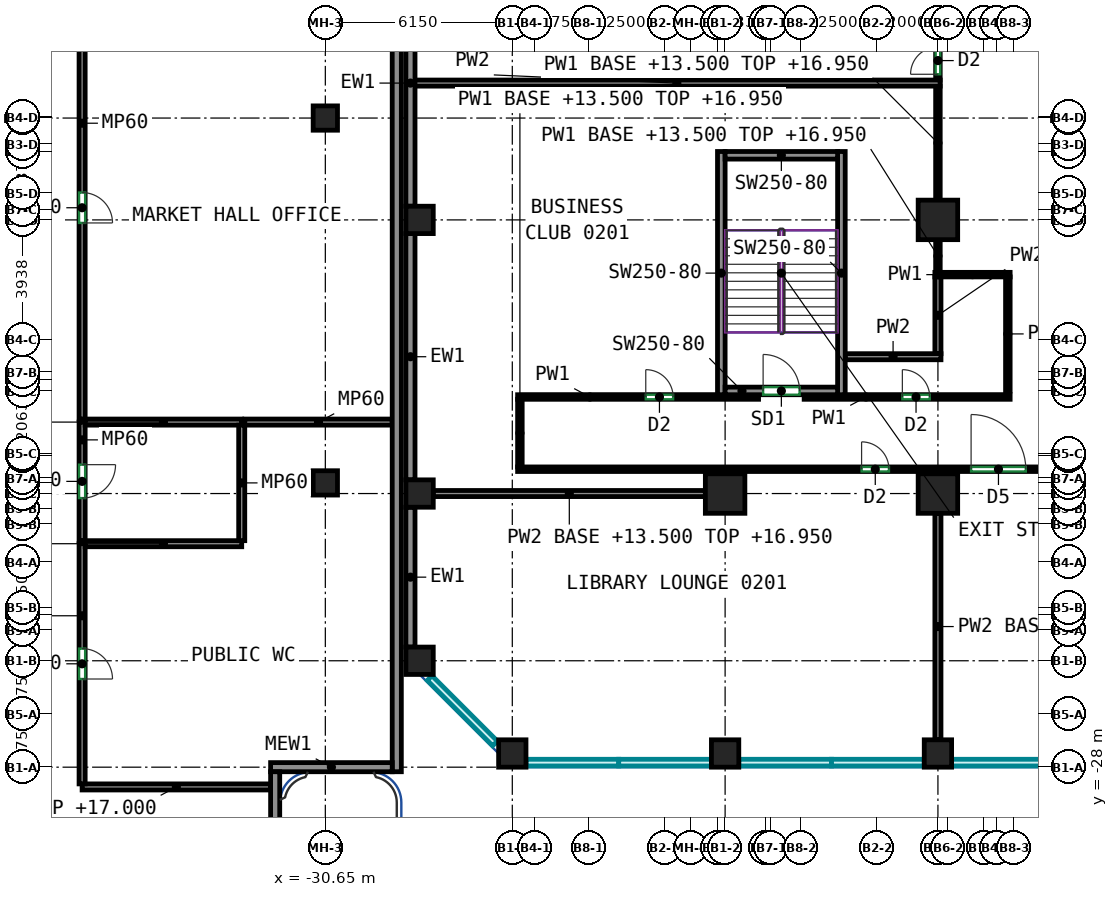
"""IFC4 building model, lengths in metres.
Left out: names, types, materials, properties, quantities, classifications, styles, units other than length and angle.
Written with IfcOpenShell. Run it as: python <this file> out.ifc"""

import sys

from ifc_helpers import new_model, si_unit, direction, frame, frame_2d, origin, origin_2d, place, context, subcontext, project, spatial, rectangle, extrude, source, transform, mapped, element, fill, save


model = new_model("IFC4")
c1 = context("Model", 3, precision=1e-05, world=origin(), true_north=direction((0.0, 1.0)))
c2 = subcontext(c1, "Body", "Model", "MODEL_VIEW")
j1 = project(units=[si_unit("LENGTHUNIT", "METRE"), si_unit("PLANEANGLEUNIT", "RADIAN")], contexts=[c1])
p1 = place(None, origin())
s1 = spatial("IfcSite", under=j1, at=p1, CompositionType="ELEMENT")
p2 = place(p1, origin())
s2 = spatial("IfcBuilding", under=s1, at=p2, CompositionType="ELEMENT")
p3 = place(p2, frame((0.0, 0.0, 13.5)))
s3 = spatial("IfcBuildingStorey", under=s2, at=p3, CompositionType="ELEMENT", Elevation=13.5)
m1 = source(origin(), c2, "Body", "SweptSolid", [
    extrude(rectangle(XDim=0.9, YDim=0.9, at=origin_2d()), origin(), (0.0, 0.0, 1.0), 4.1),
])
for number, where, z_axis, x_axis in (
    (1, (-27.55, -24.5, 0.0), (0.0, 0.0, 1.0), (1.0, 0.0, 0.0)),
    (2, (-27.55, -19.0, 0.0), (0.0, 0.0, 1.0), (1.0, 0.0, 0.0)),
    (3, (-27.55, -10.0, 0.0), (0.0, 0.0, 1.0), (1.0, 0.0, 0.0)),
    (4, (-24.5, -27.55, 0.0), (0.0, 0.0, 1.0), (1.0, 0.0, 0.0)),
    (5, (-17.5, -27.55, 0.0), (0.0, 0.0, 1.0), (1.0, 0.0, 0.0)),
):
    element("IfcColumn", number, at=place(p3, frame(where, z_axis=z_axis, x_axis=x_axis)), inside=s3, PredefinedType="COLUMN", context=c2, shape_type="MappedRepresentation", body=[
        mapped(m1, transform((0.0, 0.0, 0.0))),
    ])
m2 = source(origin(), c2, "Body", "SweptSolid", [
    extrude(rectangle(XDim=1.3, YDim=1.3, at=origin_2d()), origin(), (0.0, 0.0, 1.0), 4.1),
])
p4 = place(p3, frame((-17.5, -19.0, 0.0), z_axis=(0.0, 0.0, 1.0), x_axis=(1.0, 0.0, 0.0)))
e6 = element("IfcColumn", 6, at=p4, inside=s3, PredefinedType="COLUMN", context=c2, shape_type="MappedRepresentation", body=[
    mapped(m2, transform((0.0, 0.0, 0.0))),
])
p5 = place(p3, frame((-10.5, -27.55, 0.0), z_axis=(0.0, 0.0, 1.0), x_axis=(1.0, 0.0, 0.0)))
e7 = element("IfcColumn", 7, at=p5, inside=s3, PredefinedType="COLUMN", context=c2, shape_type="MappedRepresentation", body=[
    mapped(m1, transform((0.0, 0.0, 0.0))),
])
for number, where, z_axis, x_axis in (
    (8, (-10.5, -19.0, 0.0), (0.0, 0.0, 1.0), (1.0, 0.0, 0.0)),
    (9, (-10.5, -10.0, 0.0), (0.0, 0.0, 1.0), (1.0, 0.0, 0.0)),
):
    element("IfcColumn", number, at=place(p3, frame(where, z_axis=z_axis, x_axis=x_axis)), inside=s3, PredefinedType="COLUMN", context=c2, shape_type="MappedRepresentation", body=[
        mapped(m2, transform((0.0, 0.0, 0.0))),
    ])
m3 = source(origin(), c2, "Body", "SweptSolid", [
    extrude(rectangle(XDim=8.0, YDim=0.25, at=frame_2d((4.0, 0.0))), origin(), (0.0, 0.0, 1.0), 4.1),
])
for number, where, z_axis, x_axis in (
    (10, (-17.625, -15.75, 0.0), (0.0, 0.0, 1.0), (0.0, 1.0, 0.0)),
    (11, (-13.675, -15.75, 0.0), (0.0, 0.0, 1.0), (0.0, 1.0, 0.0)),
):
    element("IfcWall", number, at=place(p3, frame(where, z_axis=z_axis, x_axis=x_axis)), inside=s3, PredefinedType="SHEAR", context=c2, shape_type="MappedRepresentation", body=[
        mapped(m3, transform((0.0, 0.0, 0.0))),
    ])
m4 = source(origin(), c2, "Body", "SweptSolid", [
    extrude(rectangle(XDim=3.7, YDim=0.25, at=frame_2d((1.85, 0.0))), origin(), (0.0, 0.0, 1.0), 4.1),
])
p6 = place(p3, frame((-17.5, -15.625, 0.0), z_axis=(0.0, 0.0, 1.0), x_axis=(1.0, 0.0, 0.0)))
e12 = element("IfcWall", 12, at=p6, inside=s3, PredefinedType="SHEAR", context=c2, shape_type="MappedRepresentation", body=[
    mapped(m4, transform((0.0, 0.0, 0.0))),
])
p7 = place(p6, frame((1.25, 0.0, 0.0)))
e13 = element("IfcOpeningElement", 13, at=p7, cuts=e12, PredefinedType="OPENING", context=c2, shape_type="SweptSolid", body=[
    extrude(rectangle(XDim=1.2, YDim=2.1, at=frame_2d((0.6, 1.05))), frame((0.0, 0.135, 0.0), z_axis=(0.0, -1.0, 0.0), x_axis=(1.0, 0.0, 0.0)), (0.0, 0.0, 1.0), 0.27),
])
p8 = place(p3, frame((-17.5, -7.875, 0.0), z_axis=(0.0, 0.0, 1.0), x_axis=(1.0, 0.0, 0.0)))
e14 = element("IfcWall", 14, at=p8, inside=s3, PredefinedType="SHEAR", context=c2, shape_type="MappedRepresentation", body=[
    mapped(m4, transform((0.0, 0.0, 0.0))),
])
m5 = source(origin(), c2, "Body", "SweptSolid", [
    extrude(rectangle(XDim=0.8, YDim=0.8, at=origin_2d()), origin(), (0.0, 0.0, 1.0), 4.1),
])
for number, where, z_axis, x_axis in (
    (15, (-30.65, -18.65, 0.0), (0.0, 0.0, 1.0), (1.0, 0.0, 0.0)),
    (16, (-30.65, -6.65, 0.0), (0.0, 0.0, 1.0), (1.0, 0.0, 0.0)),
):
    element("IfcColumn", number, at=place(p3, frame(where, z_axis=z_axis, x_axis=x_axis)), inside=s3, PredefinedType="COLUMN", context=c2, shape_type="MappedRepresentation", body=[
        mapped(m5, transform((0.0, 0.0, 0.0))),
    ])
m6 = source(origin(), c2, "Body", "SweptSolid", [
    extrude(rectangle(XDim=8.1, YDim=0.3, at=frame_2d((4.05, 0.0))), origin(), (0.0, 0.0, 1.0), 4.1),
])
for number, where, z_axis, x_axis in (
    (17, (-27.85, -1.45, 0.0), (0.0, 0.0, 1.0), (0.0, -1.0, 0.0)),
    (18, (-27.85, -10.45, 0.0), (0.0, 0.0, 1.0), (0.0, -1.0, 0.0)),
):
    element("IfcWall", number, at=place(p3, frame(where, z_axis=z_axis, x_axis=x_axis)), inside=s3, PredefinedType="SOLIDWALL", context=c2, shape_type="MappedRepresentation", body=[
        mapped(m6, transform((0.0, 0.0, 0.0))),
    ])
m7 = source(origin(), c2, "Body", "SweptSolid", [
    extrude(rectangle(XDim=4.6, YDim=0.3, at=frame_2d((2.3, 0.0))), origin(), (0.0, 0.0, 1.0), 4.1),
])
p9 = place(p3, frame((-27.85, -19.45, 0.0), z_axis=(0.0, 0.0, 1.0), x_axis=(0.0, -1.0, 0.0)))
e19 = element("IfcWall", 19, at=p9, inside=s3, PredefinedType="SOLIDWALL", context=c2, shape_type="MappedRepresentation", body=[
    mapped(m7, transform((0.0, 0.0, 0.0))),
])
m8 = source(origin(), c2, "Body", "SweptSolid", [
    extrude(rectangle(XDim=56.3, YDim=0.3, at=frame_2d((28.15, 0.0))), origin(), (0.0, 0.0, 1.0), 4.1),
])
p10 = place(p3, frame((-28.3, 28.15, 0.0), z_axis=(0.0, 0.0, 1.0), x_axis=(0.0, -1.0, 0.0)))
e20 = element("IfcWall", 20, at=p10, inside=s3, PredefinedType="SOLIDWALL", context=c2, shape_type="MappedRepresentation", body=[
    mapped(m8, transform((0.0, 0.0, 0.0))),
])
m9 = source(origin(), c2, "Body", "SweptSolid", [
    extrude(rectangle(XDim=4.0, YDim=0.3, at=frame_2d((2.0, 0.0))), origin(), (0.0, 0.0, 1.0), 4.1),
])
p11 = place(p3, frame((-28.45, -28.0, 0.0), z_axis=(0.0, 0.0, 1.0), x_axis=(-1.0, 0.0, 0.0)))
e21 = element("IfcWall", 21, at=p11, inside=s3, PredefinedType="SOLIDWALL", context=c2, shape_type="MappedRepresentation", body=[
    mapped(m9, transform((0.0, 0.0, 0.0))),
])
m10 = source(origin(), c2, "Body", "SweptSolid", [
    extrude(rectangle(XDim=15.7, YDim=0.3, at=frame_2d((7.85, 0.0))), origin(), (0.0, 0.0, 1.0), 4.1),
])
p12 = place(p3, frame((-32.3, -28.15, 0.0), z_axis=(0.0, 0.0, 1.0), x_axis=(0.0, -1.0, 0.0)))
e22 = element("IfcWall", 22, at=p12, inside=s3, PredefinedType="SOLIDWALL", context=c2, shape_type="MappedRepresentation", body=[
    mapped(m10, transform((0.0, 0.0, 0.0))),
])
p13 = place(p12, frame((6.326, 0.0, 0.0)))
e23 = element("IfcOpeningElement", 23, at=p13, cuts=e22, PredefinedType="OPENING", context=c2, shape_type="SweptSolid", body=[
    extrude(rectangle(XDim=2.4, YDim=2.4, at=frame_2d((1.2, 1.2))), frame((0.0, 0.16, 0.0), z_axis=(0.0, -1.0, 0.0), x_axis=(1.0, 0.0, 0.0)), (0.0, 0.0, 1.0), 0.32),
])
p14 = place(p12, frame((10.997, 0.0, 0.0)))
e24 = element("IfcOpeningElement", 24, at=p14, cuts=e22, PredefinedType="OPENING", context=c2, shape_type="SweptSolid", body=[
    extrude(rectangle(XDim=2.4, YDim=2.4, at=frame_2d((1.2, 1.2))), frame((0.0, 0.16, 0.0), z_axis=(0.0, -1.0, 0.0), x_axis=(1.0, 0.0, 0.0)), (0.0, 0.0, 1.0), 0.32),
])
p15 = place(p3, frame((-24.325, -18.2, 0.0), z_axis=(0.0, 0.0, 1.0), x_axis=(1.0, 0.0, 0.0)))
e25 = element("IfcWall", 25, at=p15, inside=s3, PredefinedType="PARTITIONING", context=c2, shape_type="SweptSolid", body=[
    extrude(rectangle(XDim=48.65, YDim=0.15, at=frame_2d((24.325, 0.0))), origin(), (0.0, 0.0, 1.0), 4.1),
])
p16 = place(p15, frame((11.314, 0.0, 0.0)))
e26 = element("IfcOpeningElement", 26, at=p16, cuts=e25, PredefinedType="OPENING", context=c2, shape_type="SweptSolid", body=[
    extrude(rectangle(XDim=0.9, YDim=2.1, at=frame_2d((0.45, 1.05))), frame((0.0, 0.085, 0.0), z_axis=(0.0, -1.0, 0.0), x_axis=(1.0, 0.0, 0.0)), (0.0, 0.0, 1.0), 0.17),
])
p17 = place(p15, frame((14.916, 0.0, 0.0)))
e27 = element("IfcOpeningElement", 27, at=p17, cuts=e25, PredefinedType="OPENING", context=c2, shape_type="SweptSolid", body=[
    extrude(rectangle(XDim=1.8, YDim=2.1, at=frame_2d((0.9, 1.05))), frame((0.0, 0.085, 0.0), z_axis=(0.0, -1.0, 0.0), x_axis=(1.0, 0.0, 0.0)), (0.0, 0.0, 1.0), 0.17),
])
p18 = place(p3, frame((-24.25, -15.9, 0.0), z_axis=(0.0, 0.0, 1.0), x_axis=(0.0, -1.0, 0.0)))
e28 = element("IfcWall", 28, at=p18, inside=s3, PredefinedType="PARTITIONING", context=c2, shape_type="SweptSolid", body=[
    extrude(rectangle(XDim=2.225, YDim=0.15, at=frame_2d((1.113, 0.0))), origin(), (0.0, 0.0, 1.0), 3.45),
])
p19 = place(p3, frame((-14.9, -15.825, 0.0), z_axis=(0.0, 0.0, 1.0), x_axis=(1.0, 0.0, 0.0)))
e29 = element("IfcWall", 29, at=p19, inside=s3, PredefinedType="PARTITIONING", context=c2, shape_type="SweptSolid", body=[
    extrude(rectangle(XDim=6.775, YDim=0.15, at=frame_2d((3.387, 0.0))), origin(), (0.0, 0.0, 1.0), 4.1),
])
p20 = place(p19, frame((3.23, 0.0, 0.0)))
e30 = element("IfcOpeningElement", 30, at=p20, cuts=e29, PredefinedType="OPENING", context=c2, shape_type="SweptSolid", body=[
    extrude(rectangle(XDim=0.9, YDim=2.1, at=frame_2d((0.45, 1.05))), frame((0.0, 0.085, 0.0), z_axis=(0.0, -1.0, 0.0), x_axis=(1.0, 0.0, 0.0)), (0.0, 0.0, 1.0), 0.17),
])
p21 = place(p3, frame((-24.325, -15.825, 0.0), z_axis=(0.0, 0.0, 1.0), x_axis=(1.0, 0.0, 0.0)))
e31 = element("IfcWall", 31, at=p21, inside=s3, PredefinedType="PARTITIONING", context=c2, shape_type="SweptSolid", body=[
    extrude(rectangle(XDim=7.925, YDim=0.15, at=frame_2d((3.962, 0.0))), origin(), (0.0, 0.0, 1.0), 4.1),
])
p22 = place(p21, frame((4.215, 0.0, 0.0)))
e32 = element("IfcOpeningElement", 32, at=p22, cuts=e31, PredefinedType="OPENING", context=c2, shape_type="SweptSolid", body=[
    extrude(rectangle(XDim=0.9, YDim=2.1, at=frame_2d((0.45, 1.05))), frame((0.0, 0.085, 0.0), z_axis=(0.0, -1.0, 0.0), x_axis=(1.0, 0.0, 0.0)), (0.0, 0.0, 1.0), 0.17),
])
p23 = place(p3, frame((-10.5, -11.725, 0.0), z_axis=(0.0, 0.0, 1.0), x_axis=(0.0, 1.0, 0.0)))
e33 = element("IfcWall", 33, at=p23, inside=s3, PredefinedType="PARTITIONING", context=c2, shape_type="SweptSolid", body=[
    extrude(rectangle(XDim=1.075, YDim=0.15, at=frame_2d((0.538, 0.0))), origin(), (0.0, 0.0, 1.0), 3.45),
])
p24 = place(p3, frame((-10.5, -9.35, 0.0), z_axis=(0.0, 0.0, 1.0), x_axis=(0.0, 1.0, 0.0)))
e34 = element("IfcWall", 34, at=p24, inside=s3, PredefinedType="PARTITIONING", context=c2, shape_type="SweptSolid", body=[
    extrude(rectangle(XDim=3.76, YDim=0.15, at=frame_2d((1.88, 0.0))), origin(), (0.0, 0.0, 1.0), 3.45),
])
p25 = place(p3, frame((-10.5, -5.41, 0.0), z_axis=(0.0, 0.0, 1.0), x_axis=(0.0, 1.0, 0.0)))
e35 = element("IfcWall", 35, at=p25, inside=s3, PredefinedType="PARTITIONING", context=c2, shape_type="SweptSolid", body=[
    extrude(rectangle(XDim=3.76, YDim=0.15, at=frame_2d((1.88, 0.0))), origin(), (0.0, 0.0, 1.0), 3.45),
])
p26 = place(p25, frame((0.2, 0.0, 0.0)))
e36 = element("IfcOpeningElement", 36, at=p26, cuts=e35, PredefinedType="OPENING", context=c2, shape_type="SweptSolid", body=[
    extrude(rectangle(XDim=0.9, YDim=2.1, at=frame_2d((0.45, 1.05))), frame((0.0, 0.085, 0.0), z_axis=(0.0, -1.0, 0.0), x_axis=(1.0, 0.0, 0.0)), (0.0, 0.0, 1.0), 0.17),
])
p27 = place(p3, frame((-8.2, -11.875, 0.0), z_axis=(0.0, 0.0, 1.0), x_axis=(0.0, -1.0, 0.0)))
e37 = element("IfcWall", 37, at=p27, inside=s3, PredefinedType="PARTITIONING", context=c2, shape_type="SweptSolid", body=[
    extrude(rectangle(XDim=3.75, YDim=0.15, at=frame_2d((1.875, 0.0))), origin(), (0.0, 0.0, 1.0), 4.1),
])
p28 = place(p3, frame((-10.6, -11.8, 0.0), z_axis=(0.0, 0.0, 1.0), x_axis=(1.0, 0.0, 0.0)))
e38 = element("IfcWall", 38, at=p28, inside=s3, PredefinedType="PARTITIONING", context=c2, shape_type="SweptSolid", body=[
    extrude(rectangle(XDim=2.475, YDim=0.15, at=frame_2d((1.238, 0.0))), origin(), (0.0, 0.0, 1.0), 4.1),
])
p29 = place(p3, frame((-10.5, -27.1, 0.0), z_axis=(0.0, 0.0, 1.0), x_axis=(0.0, 1.0, 0.0)))
e39 = element("IfcWall", 39, at=p29, inside=s3, PredefinedType="PARTITIONING", context=c2, shape_type="SweptSolid", body=[
    extrude(rectangle(XDim=7.45, YDim=0.2, at=frame_2d((3.725, 0.0))), origin(), (0.0, 0.0, 1.0), 3.45),
])
p30 = place(p3, frame((-27.75, -5.5, 0.0), z_axis=(0.0, 0.0, 1.0), x_axis=(1.0, 0.0, 0.0)))
e40 = element("IfcWall", 40, at=p30, inside=s3, PredefinedType="PARTITIONING", context=c2, shape_type="SweptSolid", body=[
    extrude(rectangle(XDim=17.324, YDim=0.2, at=frame_2d((8.662, 0.0))), origin(), (0.0, 0.0, 1.0), 4.1),
])
p31 = place(p3, frame((-27.1, -19.0, 0.0), z_axis=(0.0, 0.0, 1.0), x_axis=(1.0, 0.0, 0.0)))
e41 = element("IfcWall", 41, at=p31, inside=s3, PredefinedType="PARTITIONING", context=c2, shape_type="SweptSolid", body=[
    extrude(rectangle(XDim=8.95, YDim=0.2, at=frame_2d((4.475, 0.0))), origin(), (0.0, 0.0, 1.0), 3.45),
])
p32 = place(p3, frame((-10.5, -14.4, 0.0), z_axis=(0.0, 0.0, 1.0), x_axis=(0.0, 1.0, 0.0)))
e42 = element("IfcWall", 42, at=p32, inside=s3, PredefinedType="PARTITIONING", context=c2, shape_type="SweptSolid", body=[
    extrude(rectangle(XDim=2.524, YDim=0.2, at=frame_2d((1.262, 0.0))), origin(), (0.0, 0.0, 1.0), 3.45),
])
p33 = place(p3, frame((-13.55, -14.5, 0.0), z_axis=(0.0, 0.0, 1.0), x_axis=(1.0, 0.0, 0.0)))
e43 = element("IfcWall", 43, at=p33, inside=s3, PredefinedType="PARTITIONING", context=c2, shape_type="SweptSolid", body=[
    extrude(rectangle(XDim=3.15, YDim=0.2, at=frame_2d((1.575, 0.0))), origin(), (0.0, 0.0, 1.0), 4.1),
])
m11 = source(origin(), c2, "Body", "SweptSolid", [
    extrude(rectangle(XDim=6.2, YDim=0.2, at=frame_2d((3.1, 0.0))), origin(), (0.0, 0.0, 1.0), 3.5),
])
p34 = place(p3, frame((-38.65, -28.65, 0.0), z_axis=(0.0, 0.0, 1.0), x_axis=(1.0, 0.0, 0.0)))
e44 = element("IfcWall", 44, at=p34, inside=s3, PredefinedType="PARTITIONING", context=c2, shape_type="MappedRepresentation", body=[
    mapped(m11, transform((0.0, 0.0, 0.0))),
])
m12 = source(origin(), c2, "Body", "SweptSolid", [
    extrude(rectangle(XDim=7.9, YDim=0.2, at=frame_2d((3.95, 0.0))), origin(), (0.0, 0.0, 1.0), 4.1),
])
p35 = place(p3, frame((-38.65, -20.65, 0.0), z_axis=(0.0, 0.0, 1.0), x_axis=(0.0, -1.0, 0.0)))
e45 = element("IfcWall", 45, at=p35, inside=s3, PredefinedType="PARTITIONING", context=c2, shape_type="MappedRepresentation", body=[
    mapped(m12, transform((0.0, 0.0, 0.0))),
])
p36 = place(p35, frame((3.45, 0.0, 0.0)))
e46 = element("IfcOpeningElement", 46, at=p36, cuts=e45, PredefinedType="OPENING", context=c2, shape_type="SweptSolid", body=[
    extrude(rectangle(XDim=1.0, YDim=2.1, at=frame_2d((0.5, 1.05))), frame((0.0, 0.11, 0.0), z_axis=(0.0, -1.0, 0.0), x_axis=(1.0, 0.0, 0.0)), (0.0, 0.0, 1.0), 0.22),
])
m13 = source(origin(), c2, "Body", "SweptSolid", [
    extrude(rectangle(XDim=5.15, YDim=0.2, at=frame_2d((2.575, 0.0))), origin(), (0.0, 0.0, 1.0), 3.5),
])
p37 = place(p3, frame((-38.55, -20.65, 0.0), z_axis=(0.0, 0.0, 1.0), x_axis=(1.0, 0.0, 0.0)))
e47 = element("IfcWall", 47, at=p37, inside=s3, PredefinedType="PARTITIONING", context=c2, shape_type="MappedRepresentation", body=[
    mapped(m13, transform((0.0, 0.0, 0.0))),
])
m14 = source(origin(), c2, "Body", "SweptSolid", [
    extrude(rectangle(XDim=3.9, YDim=0.2, at=frame_2d((1.95, 0.0))), origin(), (0.0, 0.0, 1.0), 3.3),
])
p38 = place(p3, frame((-38.65, -16.65, 0.0), z_axis=(0.0, 0.0, 1.0), x_axis=(0.0, -1.0, 0.0)))
e48 = element("IfcWall", 48, at=p38, inside=s3, PredefinedType="PARTITIONING", context=c2, shape_type="MappedRepresentation", body=[
    mapped(m14, transform((0.0, 0.0, 0.0))),
])
p39 = place(p38, frame((1.4, 0.0, 0.0)))
e49 = element("IfcOpeningElement", 49, at=p39, cuts=e48, PredefinedType="OPENING", context=c2, shape_type="SweptSolid", body=[
    extrude(rectangle(XDim=1.1, YDim=2.1, at=frame_2d((0.55, 1.05))), frame((0.0, 0.11, 0.0), z_axis=(0.0, -1.0, 0.0), x_axis=(1.0, 0.0, 0.0)), (0.0, 0.0, 1.0), 0.22),
])
p40 = place(p3, frame((-38.55, -16.65, 0.0), z_axis=(0.0, 0.0, 1.0), x_axis=(1.0, 0.0, 0.0)))
e50 = element("IfcWall", 50, at=p40, inside=s3, PredefinedType="PARTITIONING", context=c2, shape_type="MappedRepresentation", body=[
    mapped(m13, transform((0.0, 0.0, 0.0))),
])
m15 = source(origin(), c2, "Body", "SweptSolid", [
    extrude(rectangle(XDim=13.9, YDim=0.2, at=frame_2d((6.95, 0.0))), origin(), (0.0, 0.0, 1.0), 3.3),
])
p41 = place(p3, frame((-38.65, -2.65, 0.0), z_axis=(0.0, 0.0, 1.0), x_axis=(0.0, -1.0, 0.0)))
e51 = element("IfcWall", 51, at=p41, inside=s3, PredefinedType="PARTITIONING", context=c2, shape_type="MappedRepresentation", body=[
    mapped(m15, transform((0.0, 0.0, 0.0))),
])
p42 = place(p41, frame((6.45, 0.0, 0.0)))
e52 = element("IfcOpeningElement", 52, at=p42, cuts=e51, PredefinedType="OPENING", context=c2, shape_type="SweptSolid", body=[
    extrude(rectangle(XDim=1.0, YDim=2.1, at=frame_2d((0.5, 1.05))), frame((0.0, 0.11, 0.0), z_axis=(0.0, -1.0, 0.0), x_axis=(1.0, 0.0, 0.0)), (0.0, 0.0, 1.0), 0.22),
])
m16 = source(origin(), c2, "Body", "SweptSolid", [
    extrude(rectangle(XDim=3.8, YDim=0.2, at=frame_2d((1.9, 0.0))), origin(), (0.0, 0.0, 1.0), 3.3),
])
p43 = place(p3, frame((-33.4, -20.55, 0.0), z_axis=(0.0, 0.0, 1.0), x_axis=(0.0, 1.0, 0.0)))
e53 = element("IfcWall", 53, at=p43, inside=s3, PredefinedType="PARTITIONING", context=c2, shape_type="MappedRepresentation", body=[
    mapped(m16, transform((0.0, 0.0, 0.0))),
])
m17 = source(origin(), c2, "Body", "SweptSolid", [
    extrude(rectangle(XDim=4.85, YDim=0.2, at=frame_2d((2.425, 0.0))), origin(), (0.0, 0.0, 1.0), 3.3),
])
p44 = place(p3, frame((-33.3, -16.65, 0.0), z_axis=(0.0, 0.0, 1.0), x_axis=(1.0, 0.0, 0.0)))
e54 = element("IfcWall", 54, at=p44, inside=s3, PredefinedType="PARTITIONING", context=c2, shape_type="MappedRepresentation", body=[
    mapped(m17, transform((0.0, 0.0, 0.0))),
])
p45 = place(p7, origin())
e55 = element("IfcDoor", 55, at=p45, inside=s3, OperationType="DOUBLE_DOOR_SINGLE_SWING", PredefinedType="DOOR", context=c2, shape_type="SweptSolid", body=[
    extrude(rectangle(XDim=1.2, YDim=2.1, at=frame_2d((0.6, 1.05))), frame((0.0, 0.025, 0.0), z_axis=(0.0, -1.0, 0.0), x_axis=(1.0, 0.0, 0.0)), (0.0, 0.0, 1.0), 0.05),
])
fill(e13, e55)
p46 = place(p16, origin())
e56 = element("IfcDoor", 56, at=p46, inside=s3, OperationType="SINGLE_SWING_LEFT", PredefinedType="DOOR", context=c2, shape_type="SweptSolid", body=[
    extrude(rectangle(XDim=0.9, YDim=2.1, at=frame_2d((0.45, 1.05))), frame((0.0, 0.025, 0.0), z_axis=(0.0, -1.0, 0.0), x_axis=(1.0, 0.0, 0.0)), (0.0, 0.0, 1.0), 0.05),
])
fill(e26, e56)
p47 = place(p17, origin())
e57 = element("IfcDoor", 57, at=p47, inside=s3, OperationType="DOUBLE_DOOR_SINGLE_SWING", PredefinedType="DOOR", context=c2, shape_type="SweptSolid", body=[
    extrude(rectangle(XDim=1.8, YDim=2.1, at=frame_2d((0.9, 1.05))), frame((0.0, 0.025, 0.0), z_axis=(0.0, -1.0, 0.0), x_axis=(1.0, 0.0, 0.0)), (0.0, 0.0, 1.0), 0.05),
])
fill(e27, e57)
p48 = place(p22, origin())
e58 = element("IfcDoor", 58, at=p48, inside=s3, OperationType="SINGLE_SWING_LEFT", PredefinedType="DOOR", context=c2, shape_type="SweptSolid", body=[
    extrude(rectangle(XDim=0.9, YDim=2.1, at=frame_2d((0.45, 1.05))), frame((0.0, 0.025, 0.0), z_axis=(0.0, -1.0, 0.0), x_axis=(1.0, 0.0, 0.0)), (0.0, 0.0, 1.0), 0.05),
])
fill(e32, e58)
p49 = place(p20, origin())
e59 = element("IfcDoor", 59, at=p49, inside=s3, OperationType="SINGLE_SWING_LEFT", PredefinedType="DOOR", context=c2, shape_type="SweptSolid", body=[
    extrude(rectangle(XDim=0.9, YDim=2.1, at=frame_2d((0.45, 1.05))), frame((0.0, 0.025, 0.0), z_axis=(0.0, -1.0, 0.0), x_axis=(1.0, 0.0, 0.0)), (0.0, 0.0, 1.0), 0.05),
])
fill(e30, e59)
p50 = place(p26, origin())
e60 = element("IfcDoor", 60, at=p50, inside=s3, OperationType="SINGLE_SWING_LEFT", PredefinedType="DOOR", context=c2, shape_type="SweptSolid", body=[
    extrude(rectangle(XDim=0.9, YDim=2.1, at=frame_2d((0.45, 1.05))), frame((0.0, 0.025, 0.0), z_axis=(0.0, -1.0, 0.0), x_axis=(1.0, 0.0, 0.0)), (0.0, 0.0, 1.0), 0.05),
])
fill(e36, e60)
p51 = place(p36, origin())
e61 = element("IfcDoor", 61, at=p51, inside=s3, OperationType="SINGLE_SWING_RIGHT", PredefinedType="DOOR", context=c2, shape_type="SweptSolid", body=[
    extrude(rectangle(XDim=1.0, YDim=2.1, at=frame_2d((0.5, 1.05))), frame((0.0, 0.025, 0.0), z_axis=(0.0, -1.0, 0.0), x_axis=(1.0, 0.0, 0.0)), (0.0, 0.0, 1.0), 0.05),
])
fill(e46, e61)
p52 = place(p39, origin())
e62 = element("IfcDoor", 62, at=p52, inside=s3, OperationType="SINGLE_SWING_LEFT", PredefinedType="DOOR", context=c2, shape_type="SweptSolid", body=[
    extrude(rectangle(XDim=1.1, YDim=2.1, at=frame_2d((0.55, 1.05))), frame((0.0, 0.025, 0.0), z_axis=(0.0, -1.0, 0.0), x_axis=(1.0, 0.0, 0.0)), (0.0, 0.0, 1.0), 0.05),
])
fill(e49, e62)
p53 = place(p42, origin())
e63 = element("IfcDoor", 63, at=p53, inside=s3, OperationType="SINGLE_SWING_RIGHT", PredefinedType="DOOR", context=c2, shape_type="SweptSolid", body=[
    extrude(rectangle(XDim=1.0, YDim=2.1, at=frame_2d((0.5, 1.05))), frame((0.0, 0.025, 0.0), z_axis=(0.0, -1.0, 0.0), x_axis=(1.0, 0.0, 0.0)), (0.0, 0.0, 1.0), 0.05),
])
fill(e52, e63)
save(model, sys.argv[1])
